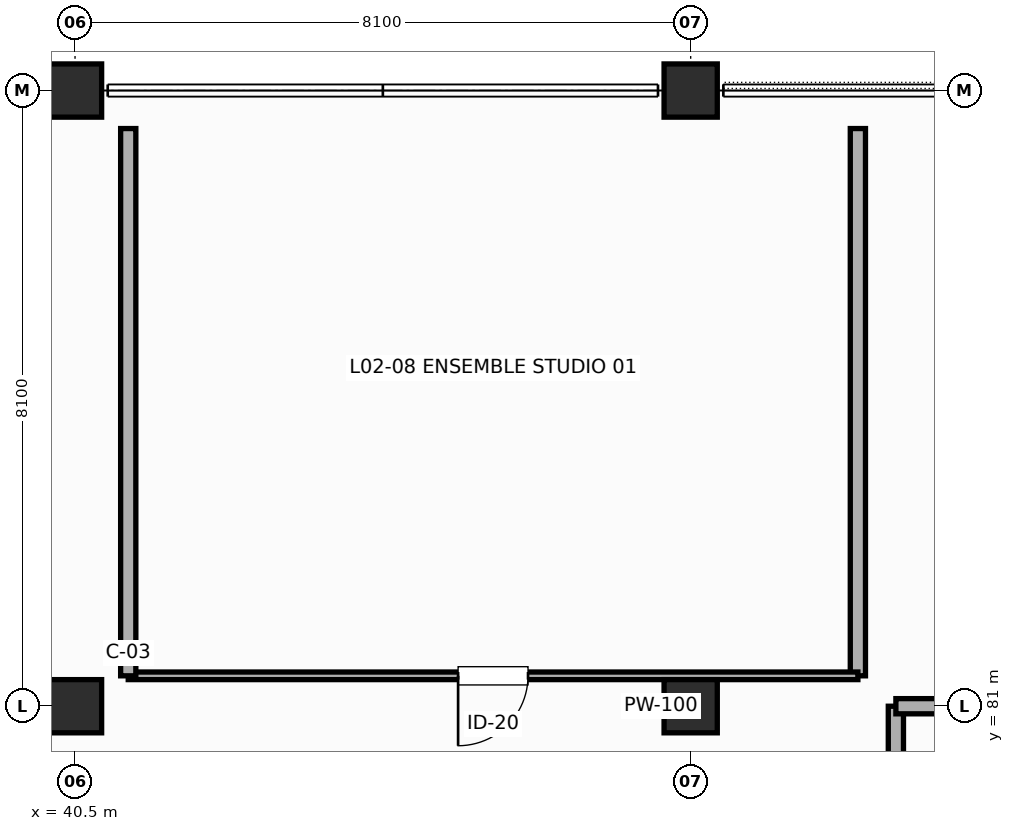
"""IFC4 building model, lengths in metres.
Left out: names, types, materials, properties, quantities, classifications, styles, units other than length and angle.
Written with IfcOpenShell. Run it as: python <this file> out.ifc"""

import sys

from ifc_helpers import new_model, si_unit, direction, frame, frame_2d, origin, origin_2d, place, context, subcontext, project, spatial, rectangle, extrude, element, fill, save


model = new_model("IFC4")
c1 = context("Model", 3, precision=1e-05, world=origin(), true_north=direction((0.0, 1.0)))
c2 = subcontext(c1, "Body", "Model", "MODEL_VIEW")
j1 = project(units=[si_unit("LENGTHUNIT", "METRE"), si_unit("PLANEANGLEUNIT", "RADIAN")], contexts=[c1])
p1 = place(None, origin())
s1 = spatial("IfcSite", under=j1, at=p1, CompositionType="ELEMENT")
p2 = place(p1, origin())
s2 = spatial("IfcBuilding", under=s1, at=p2, CompositionType="ELEMENT")
p3 = place(p2, frame((0.0, 0.0, 10.2)))
s3 = spatial("IfcBuildingStorey", under=s2, at=p3, CompositionType="ELEMENT", Elevation=10.2)
for number, where, z_axis, x_axis in (
    (1, (40.5, 81.0, 0.0), (0.0, 0.0, 1.0), (1.0, 0.0, 0.0)),
    (2, (40.5, 89.1, 0.0), (0.0, 0.0, 1.0), (1.0, 0.0, 0.0)),
    (3, (48.6, 81.0, 0.0), (0.0, 0.0, 1.0), (1.0, 0.0, 0.0)),
    (4, (48.6, 89.1, 0.0), (0.0, 0.0, 1.0), (1.0, 0.0, 0.0)),
):
    element("IfcColumn", number, at=place(p3, frame(where, z_axis=z_axis, x_axis=x_axis)), inside=s3, PredefinedType="COLUMN", context=c2, shape_type="SweptSolid", body=[
        extrude(rectangle(XDim=0.7, YDim=0.7, at=origin_2d()), origin(), (0.0, 0.0, 1.0), 4.8),
    ])
p4 = place(p3, frame((51.3, 72.9, 0.0), z_axis=(0.0, 0.0, 1.0), x_axis=(0.0, 1.0, 0.0)))
e5 = element("IfcWall", 5, at=p4, inside=s3, PredefinedType="PARTITIONING", context=c2, shape_type="SweptSolid", body=[
    extrude(rectangle(XDim=8.1, YDim=0.2, at=frame_2d((4.05, 0.0))), origin(), (0.0, 0.0, 1.0), 4.5),
])
p5 = place(p4, frame((3.15, 0.0, 0.0)))
e6 = element("IfcOpeningElement", 6, at=p5, cuts=e5, PredefinedType="OPENING", context=c2, shape_type="SweptSolid", body=[
    extrude(rectangle(XDim=1.8, YDim=2.25, at=frame_2d((0.9, 1.125))), frame((0.0, 0.11, 0.0), z_axis=(0.0, -1.0, 0.0), x_axis=(1.0, 0.0, 0.0)), (0.0, 0.0, 1.0), 0.22),
])
p6 = place(p3, frame((51.3, 81.0, 0.0), z_axis=(0.0, 0.0, 1.0), x_axis=(1.0, 0.0, 0.0)))
e7 = element("IfcWall", 7, at=p6, inside=s3, PredefinedType="PARTITIONING", context=c2, shape_type="SweptSolid", body=[
    extrude(rectangle(XDim=5.05, YDim=0.2, at=frame_2d((2.525, 0.0))), origin(), (0.0, 0.0, 1.0), 4.021),
])
p7 = place(p3, frame((50.8, 88.6, 0.0), z_axis=(0.0, 0.0, 1.0), x_axis=(0.0, -1.0, 0.0)))
e8 = element("IfcWall", 8, at=p7, inside=s3, PredefinedType="PARTITIONING", context=c2, shape_type="SweptSolid", body=[
    extrude(rectangle(XDim=7.2, YDim=0.2, at=frame_2d((3.6, 0.0))), origin(), (0.0, 0.0, 1.0), 4.52),
])
p8 = place(p3, frame((50.8, 81.4, 0.0), z_axis=(0.0, 0.0, 1.0), x_axis=(-1.0, 0.0, 0.0)))
e9 = element("IfcWall", 9, at=p8, inside=s3, PredefinedType="PARTITIONING", context=c2, shape_type="SweptSolid", body=[
    extrude(rectangle(XDim=9.6, YDim=0.1, at=frame_2d((4.8, 0.0))), origin(), (0.0, 0.0, 1.0), 4.52),
])
p9 = place(p8, frame((4.34, 0.0, 0.0)))
e10 = element("IfcOpeningElement", 10, at=p9, cuts=e9, PredefinedType="OPENING", context=c2, shape_type="SweptSolid", body=[
    extrude(rectangle(XDim=0.92, YDim=2.1, at=frame_2d((0.46, 1.05))), frame((0.0, 0.06, 0.0), z_axis=(0.0, -1.0, 0.0), x_axis=(1.0, 0.0, 0.0)), (0.0, 0.0, 1.0), 0.12),
])
p10 = place(p3, frame((41.2, 81.4, 0.0), z_axis=(0.0, 0.0, 1.0), x_axis=(0.0, 1.0, 0.0)))
e11 = element("IfcWall", 11, at=p10, inside=s3, PredefinedType="PARTITIONING", context=c2, shape_type="SweptSolid", body=[
    extrude(rectangle(XDim=7.2, YDim=0.2, at=frame_2d((3.6, 0.0))), origin(), (0.0, 0.0, 1.0), 4.52),
])
p11 = place(p9, origin())
e12 = element("IfcDoor", 12, at=p11, inside=s3, OperationType="SINGLE_SWING_RIGHT", PredefinedType="DOOR", context=c2, shape_type="SweptSolid", body=[
    extrude(rectangle(XDim=0.92, YDim=2.1, at=frame_2d((0.46, 1.05))), frame((0.0, 0.025, 0.0), z_axis=(0.0, -1.0, 0.0), x_axis=(1.0, 0.0, 0.0)), (0.0, 0.0, 1.0), 0.05),
])
fill(e10, e12)
save(model, sys.argv[1])
